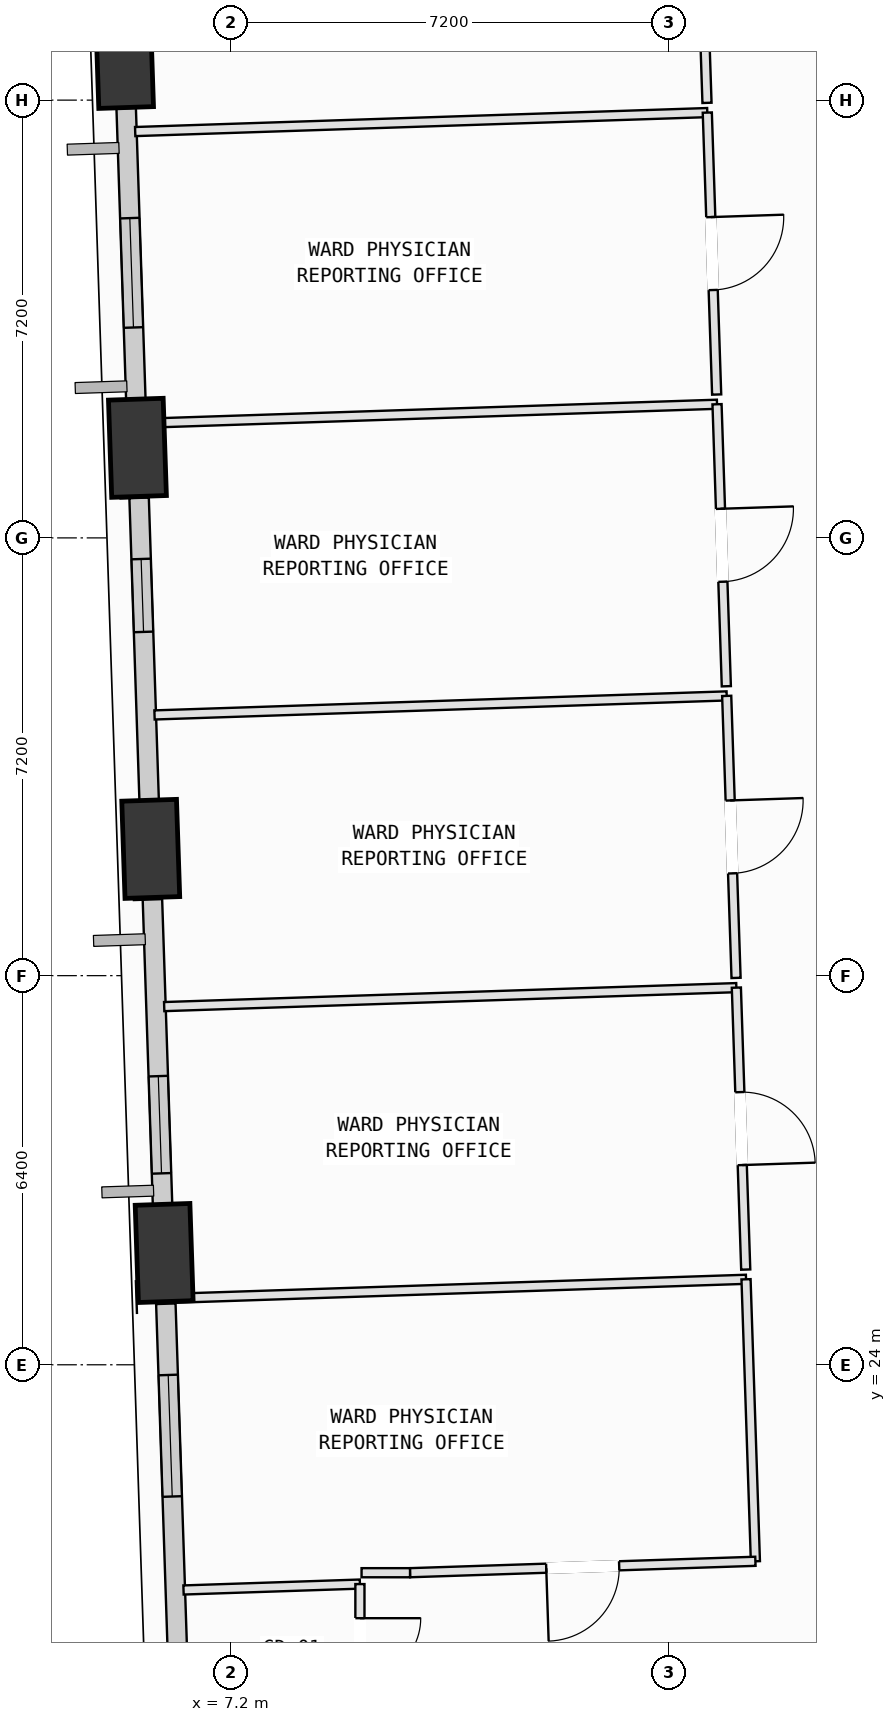
"""IFC4 building model, lengths in metres.
Left out: names, types, materials, properties, quantities, classifications, styles, units other than length and angle.
Written with IfcOpenShell. Run it as: python <this file> out.ifc"""

import sys

from ifc_helpers import new_model, si_unit, direction, frame, frame_2d, origin, origin_2d, place, context, subcontext, project, spatial, rectangle, extrude, element, fill, save


model = new_model("IFC4")
c1 = context("Model", 3, precision=1e-05, world=origin(), true_north=direction((0.0, 1.0)))
c2 = subcontext(c1, "Body", "Model", "MODEL_VIEW")
j1 = project(units=[si_unit("LENGTHUNIT", "METRE"), si_unit("PLANEANGLEUNIT", "RADIAN")], contexts=[c1])
p1 = place(None, origin())
s1 = spatial("IfcSite", under=j1, at=p1, CompositionType="ELEMENT")
p2 = place(p1, origin())
s2 = spatial("IfcBuilding", under=s1, at=p2, CompositionType="ELEMENT")
p3 = place(p2, frame((0.0, 0.0, 31.0)))
s3 = spatial("IfcBuildingStorey", under=s2, at=p3, CompositionType="ELEMENT", Elevation=31.0)
p4 = place(p3, frame((5.449, 45.478, 0.002), z_axis=(-0.083853767304, -0.116198226935, 0.989680007763), x_axis=(0.551939355085, 0.821493784414, 0.143216306606)))
e1 = element("IfcColumn", 1, at=p4, inside=s3, PredefinedType="COLUMN", context=c2, shape_type="SweptSolid", body=[
    extrude(rectangle(XDim=1.6, YDim=0.9, at=origin_2d()), origin(), (0.0, 0.0, 1.0), 4.038),
])
p5 = place(p3, frame((5.661, 39.081, 0.002), z_axis=(-0.057790356596, -0.115338405618, 0.99164374998), x_axis=(0.414334782227, 0.900945231317, 0.128935559113)))
e2 = element("IfcColumn", 2, at=p5, inside=s3, PredefinedType="COLUMN", context=c2, shape_type="SweptSolid", body=[
    extrude(rectangle(XDim=1.6, YDim=0.9, at=origin_2d()), origin(), (0.0, 0.0, 1.0), 4.03),
])
p6 = place(p3, frame((5.88, 32.485, 0.002), z_axis=(-0.030692823871, -0.114339867582, 0.992967444202), x_axis=(0.225270475905, 0.96708477646, 0.11832264291)))
e3 = element("IfcColumn", 3, at=p6, inside=s3, PredefinedType="COLUMN", context=c2, shape_type="SweptSolid", body=[
    extrude(rectangle(XDim=1.6, YDim=0.9, at=origin_2d()), origin(), (0.0, 0.0, 1.0), 4.025),
])
p7 = place(p3, frame((6.1, 25.839, 0.002), z_axis=(-0.00333816856, -0.113254955138, 0.993560351346), x_axis=(-0.003884586791, 0.993559859263, 0.113241847594)))
e4 = element("IfcColumn", 4, at=p7, inside=s3, PredefinedType="COLUMN", context=c2, shape_type="SweptSolid", body=[
    extrude(rectangle(XDim=1.6, YDim=0.9, at=origin_2d()), origin(), (0.0, 0.0, 1.0), 4.022),
])
p8 = place(p3, frame((5.649, 39.448, 0.0), z_axis=(0.0, 0.0, 1.0), x_axis=(-0.033140517624, 0.999450702182, 0.0)))
e5 = element("IfcWall", 5, at=p8, inside=s3, PredefinedType="SOLIDWALL", context=c2, shape_type="SweptSolid", body=[
    extrude(rectangle(XDim=5.223, YDim=0.32, at=frame_2d((2.612, 0.0))), origin(), (0.0, 0.0, 1.0), 3.165),
])
p9 = place(p8, frame((1.614, 0.0, 0.75)))
e6 = element("IfcOpeningElement", 6, at=p9, cuts=e5, PredefinedType="OPENING", context=c2, shape_type="SweptSolid", body=[
    extrude(rectangle(XDim=1.8, YDim=2.05, at=frame_2d((0.9, 1.025))), frame((0.0, 0.17, 0.0), z_axis=(0.0, -1.0, 0.0), x_axis=(1.0, 0.0, 0.0)), (0.0, 0.0, 1.0), 0.34),
])
p10 = place(p3, frame((5.867, 32.861, 0.0), z_axis=(0.0, 0.0, 1.0), x_axis=(-0.033135713124, 0.999450861481, 0.0)))
e7 = element("IfcWall", 7, at=p10, inside=s3, PredefinedType="SOLIDWALL", context=c2, shape_type="SweptSolid", body=[
    extrude(rectangle(XDim=5.401, YDim=0.32, at=frame_2d((2.7, 0.0))), origin(), (0.0, 0.0, 1.0), 3.165),
])
p11 = place(p10, frame((3.195, 0.0, 0.75)))
e8 = element("IfcOpeningElement", 8, at=p11, cuts=e7, PredefinedType="OPENING", context=c2, shape_type="SweptSolid", body=[
    extrude(rectangle(XDim=1.2, YDim=1.75, at=frame_2d((0.6, 0.875))), frame((0.0, 0.17, 0.0), z_axis=(0.0, -1.0, 0.0), x_axis=(1.0, 0.0, 0.0)), (0.0, 0.0, 1.0), 0.34),
])
p12 = place(p3, frame((6.088, 26.219, 0.0), z_axis=(0.0, 0.0, 1.0), x_axis=(-0.033177305137, 0.999449481677, 0.0)))
e9 = element("IfcWall", 9, at=p12, inside=s3, PredefinedType="SOLIDWALL", context=c2, shape_type="SweptSolid", body=[
    extrude(rectangle(XDim=5.438, YDim=0.32, at=frame_2d((2.719, 0.0))), origin(), (0.0, 0.0, 1.0), 3.165),
])
p13 = place(p12, frame((0.93, 0.0, 0.75)))
e10 = element("IfcOpeningElement", 10, at=p13, cuts=e9, PredefinedType="OPENING", context=c2, shape_type="SweptSolid", body=[
    extrude(rectangle(XDim=1.6, YDim=1.95, at=frame_2d((0.8, 0.975))), frame((0.0, 0.17, 0.0), z_axis=(0.0, -1.0, 0.0), x_axis=(1.0, 0.0, 0.0)), (0.0, 0.0, 1.0), 0.34),
])
p14 = place(p3, frame((6.365, 17.872, 0.0), z_axis=(0.0, 0.0, 1.0), x_axis=(-0.033150797565, 0.999450361259, 0.0)))
e11 = element("IfcWall", 11, at=p14, inside=s3, PredefinedType="SOLIDWALL", context=c2, shape_type="SweptSolid", body=[
    extrude(rectangle(XDim=7.136, YDim=0.32, at=frame_2d((3.568, 0.0))), origin(), (0.0, 0.0, 1.0), 3.165),
])
p15 = place(p14, frame((3.964, 0.0, 0.75)))
e12 = element("IfcOpeningElement", 12, at=p15, cuts=e11, PredefinedType="OPENING", context=c2, shape_type="SweptSolid", body=[
    extrude(rectangle(XDim=2.0, YDim=1.95, at=frame_2d((1.0, 0.975))), frame((0.0, 0.17, 0.0), z_axis=(0.0, -1.0, 0.0), x_axis=(1.0, 0.0, 0.0)), (0.0, 0.0, 1.0), 0.34),
])
p16 = place(p3, frame((6.419, 20.296, 0.0), z_axis=(0.0, 0.0, 1.0), x_axis=(0.999439573388, 0.033474455121, 0.0)))
e13 = element("IfcWall", 13, at=p16, inside=s3, PredefinedType="PARTITIONING", context=c2, shape_type="SweptSolid", body=[
    extrude(rectangle(XDim=2.903, YDim=0.15, at=frame_2d((1.451, 0.0))), origin(), (0.0, 0.0, 1.0), 3.78),
])
p17 = place(p3, frame((9.32, 20.393, 0.0), z_axis=(0.0, 0.0, 1.0), x_axis=(0.0, -1.0, 0.0)))
e14 = element("IfcWall", 14, at=p17, inside=s3, PredefinedType="PARTITIONING", context=c2, shape_type="SweptSolid", body=[
    extrude(rectangle(XDim=2.122, YDim=0.15, at=frame_2d((1.061, 0.0))), origin(), (0.0, 0.0, 1.0), 3.78),
])
p18 = place(p17, frame((0.561, 0.0, 0.0)))
e15 = element("IfcOpeningElement", 15, at=p18, cuts=e14, PredefinedType="OPENING", context=c2, shape_type="SweptSolid", body=[
    extrude(rectangle(XDim=1.0, YDim=2.12, at=frame_2d((0.5, 1.06))), frame((0.0, 0.085, 0.0), z_axis=(0.0, -1.0, 0.0), x_axis=(1.0, 0.0, 0.0)), (0.0, 0.0, 1.0), 0.17),
])
p19 = place(p3, frame((6.229, 25.093, 0.0), z_axis=(0.0, 0.0, 1.0), x_axis=(0.999450914597, 0.033134111004, 0.0)))
e16 = element("IfcWall", 16, at=p19, inside=s3, PredefinedType="PARTITIONING", context=c2, shape_type="SweptSolid", body=[
    extrude(rectangle(XDim=9.446, YDim=0.15, at=frame_2d((4.723, 0.0))), origin(), (0.0, 0.0, 1.0), 3.78),
])
p20 = place(p3, frame((15.67, 25.406, 0.0), z_axis=(0.0, 0.0, 1.0), x_axis=(0.033197462788, -0.999448812328, 0.0)))
e17 = element("IfcWall", 17, at=p20, inside=s3, PredefinedType="PARTITIONING", context=c2, shape_type="SweptSolid", body=[
    extrude(rectangle(XDim=4.64, YDim=0.15, at=frame_2d((2.32, 0.0))), origin(), (0.0, 0.0, 1.0), 3.78),
])
p21 = place(p3, frame((15.824, 20.768, 0.0), z_axis=(0.0, 0.0, 1.0), x_axis=(-0.999452746279, -0.033078814298, 0.0)))
e18 = element("IfcWall", 18, at=p21, inside=s3, PredefinedType="PARTITIONING", context=c2, shape_type="SweptSolid", body=[
    extrude(rectangle(XDim=5.683, YDim=0.15, at=frame_2d((2.842, 0.0))), origin(), (0.0, 0.0, 1.0), 3.78),
])
p22 = place(p21, frame((2.242, 0.0, 0.0)))
e19 = element("IfcOpeningElement", 19, at=p22, cuts=e18, PredefinedType="OPENING", context=c2, shape_type="SweptSolid", body=[
    extrude(rectangle(XDim=1.2, YDim=2.15, at=frame_2d((0.6, 1.075))), frame((0.0, 0.085, 0.0), z_axis=(0.0, -1.0, 0.0), x_axis=(1.0, 0.0, 0.0)), (0.0, 0.0, 1.0), 0.17),
])
p23 = place(p3, frame((10.144, 20.58, 0.0), z_axis=(0.0, 0.0, 1.0), x_axis=(-1.0, 0.0, 0.0)))
e20 = element("IfcWall", 20, at=p23, inside=s3, PredefinedType="PARTITIONING", context=c2, shape_type="SweptSolid", body=[
    extrude(rectangle(XDim=0.797, YDim=0.15, at=frame_2d((0.398, 0.0))), origin(), (0.0, 0.0, 1.0), 3.78),
])
p24 = place(p3, frame((6.101, 29.891, 0.0), z_axis=(0.0, 0.0, 1.0), x_axis=(0.999451592483, 0.033113657048, 0.0)))
e21 = element("IfcWall", 21, at=p24, inside=s3, PredefinedType="PARTITIONING", context=c2, shape_type="SweptSolid", body=[
    extrude(rectangle(XDim=9.415, YDim=0.15, at=frame_2d((4.708, 0.0))), origin(), (0.0, 0.0, 1.0), 3.78),
])
p25 = place(p3, frame((15.511, 30.203, 0.0), z_axis=(0.0, 0.0, 1.0), x_axis=(0.033204446596, -0.999448580331, 0.0)))
e22 = element("IfcWall", 22, at=p25, inside=s3, PredefinedType="PARTITIONING", context=c2, shape_type="SweptSolid", body=[
    extrude(rectangle(XDim=4.639, YDim=0.15, at=frame_2d((2.32, 0.0))), origin(), (0.0, 0.0, 1.0), 3.78),
])
p26 = place(p25, frame((1.72, 0.0, 0.0)))
e23 = element("IfcOpeningElement", 23, at=p26, cuts=e22, PredefinedType="OPENING", context=c2, shape_type="SweptSolid", body=[
    extrude(rectangle(XDim=1.2, YDim=2.15, at=frame_2d((0.6, 1.075))), frame((0.0, 0.085, 0.0), z_axis=(0.0, -1.0, 0.0), x_axis=(1.0, 0.0, 0.0)), (0.0, 0.0, 1.0), 0.17),
])
p27 = place(p3, frame((5.89, 25.242, 0.0), z_axis=(0.0, 0.0, 1.0), x_axis=(-0.032987831618, 0.99945575338, 0.0)))
e24 = element("IfcWall", 24, at=p27, inside=s3, PredefinedType="PARTITIONING", context=c2, shape_type="SweptSolid", body=[
    extrude(rectangle(XDim=0.969, YDim=0.15, at=frame_2d((0.485, 0.0))), origin(), (0.0, 0.0, 1.0), 3.165),
])
p28 = place(p3, frame((5.942, 34.688, 0.0), z_axis=(0.0, 0.0, 1.0), x_axis=(0.999447321799, 0.033242306625, 0.0)))
e25 = element("IfcWall", 25, at=p28, inside=s3, PredefinedType="PARTITIONING", context=c2, shape_type="SweptSolid", body=[
    extrude(rectangle(XDim=9.415, YDim=0.15, at=frame_2d((4.708, 0.0))), origin(), (0.0, 0.0, 1.0), 3.78),
])
p29 = place(p3, frame((15.352, 35.001, 0.0), z_axis=(0.0, 0.0, 1.0), x_axis=(0.033197462788, -0.999448812328, 0.0)))
e26 = element("IfcWall", 26, at=p29, inside=s3, PredefinedType="PARTITIONING", context=c2, shape_type="SweptSolid", body=[
    extrude(rectangle(XDim=4.64, YDim=0.15, at=frame_2d((2.32, 0.0))), origin(), (0.0, 0.0, 1.0), 2.865),
])
p30 = place(p29, frame((1.72, 0.0, 0.0)))
e27 = element("IfcOpeningElement", 27, at=p30, cuts=e26, PredefinedType="OPENING", context=c2, shape_type="SweptSolid", body=[
    extrude(rectangle(XDim=1.2, YDim=2.15, at=frame_2d((0.6, 1.075))), frame((0.0, 0.085, 0.0), z_axis=(0.0, -1.0, 0.0), x_axis=(1.0, 0.0, 0.0)), (0.0, 0.0, 1.0), 0.17),
])
p31 = place(p3, frame((5.678, 31.646, 0.0), z_axis=(0.0, 0.0, 1.0), x_axis=(-0.033153285945, 0.999450278719, 0.0)))
e28 = element("IfcWall", 28, at=p31, inside=s3, PredefinedType="PARTITIONING", context=c2, shape_type="SweptSolid", body=[
    extrude(rectangle(XDim=1.208, YDim=0.15, at=frame_2d((0.604, 0.0))), origin(), (0.0, 0.0, 1.0), 3.165),
])
p32 = place(p3, frame((5.783, 39.486, 0.0), z_axis=(0.0, 0.0, 1.0), x_axis=(0.999450762432, 0.03313870056, 0.0)))
e29 = element("IfcWall", 29, at=p32, inside=s3, PredefinedType="PARTITIONING", context=c2, shape_type="SweptSolid", body=[
    extrude(rectangle(XDim=9.415, YDim=0.15, at=frame_2d((4.708, 0.0))), origin(), (0.0, 0.0, 1.0), 3.78),
])
p33 = place(p3, frame((15.193, 39.798, 0.0), z_axis=(0.0, 0.0, 1.0), x_axis=(0.032932963172, -0.999457562849, 0.0)))
e30 = element("IfcWall", 30, at=p33, inside=s3, PredefinedType="PARTITIONING", context=c2, shape_type="SweptSolid", body=[
    extrude(rectangle(XDim=4.641, YDim=0.15, at=frame_2d((2.32, 0.0))), origin(), (0.0, 0.0, 1.0), 2.865),
])
p34 = place(p33, frame((1.72, 0.0, 0.0)))
e31 = element("IfcOpeningElement", 31, at=p34, cuts=e30, PredefinedType="OPENING", context=c2, shape_type="SweptSolid", body=[
    extrude(rectangle(XDim=1.2, YDim=2.15, at=frame_2d((0.6, 1.075))), frame((0.0, 0.085, 0.0), z_axis=(0.0, -1.0, 0.0), x_axis=(1.0, 0.0, 0.0)), (0.0, 0.0, 1.0), 0.17),
])
p35 = place(p3, frame((5.459, 38.251, 0.0), z_axis=(0.0, 0.0, 1.0), x_axis=(-0.033656486127, 0.999433459987, 0.0)))
e32 = element("IfcWall", 32, at=p35, inside=s3, PredefinedType="PARTITIONING", context=c2, shape_type="SweptSolid", body=[
    extrude(rectangle(XDim=1.19, YDim=0.15, at=frame_2d((0.595, 0.0))), origin(), (0.0, 0.0, 1.0), 3.165),
])
p36 = place(p3, frame((5.624, 44.283, 0.0), z_axis=(0.0, 0.0, 1.0), x_axis=(0.999450620025, 0.03314299521, 0.0)))
e33 = element("IfcWall", 33, at=p36, inside=s3, PredefinedType="PARTITIONING", context=c2, shape_type="SweptSolid", body=[
    extrude(rectangle(XDim=9.414, YDim=0.15, at=frame_2d((4.707, 0.0))), origin(), (0.0, 0.0, 1.0), 3.78),
])
p37 = place(p3, frame((15.033, 44.595, 0.0), z_axis=(0.0, 0.0, 1.0), x_axis=(0.033204446596, -0.999448580331, 0.0)))
e34 = element("IfcWall", 34, at=p37, inside=s3, PredefinedType="PARTITIONING", context=c2, shape_type="SweptSolid", body=[
    extrude(rectangle(XDim=4.639, YDim=0.15, at=frame_2d((2.32, 0.0))), origin(), (0.0, 0.0, 1.0), 2.865),
])
p38 = place(p37, frame((1.72, 0.0, 0.0)))
e35 = element("IfcOpeningElement", 35, at=p38, cuts=e34, PredefinedType="OPENING", context=c2, shape_type="SweptSolid", body=[
    extrude(rectangle(XDim=1.2, YDim=2.15, at=frame_2d((0.6, 1.075))), frame((0.0, 0.085, 0.0), z_axis=(0.0, -1.0, 0.0), x_axis=(1.0, 0.0, 0.0)), (0.0, 0.0, 1.0), 0.17),
])
p39 = place(p3, frame((14.871, 49.483, 0.0), z_axis=(0.0, 0.0, 1.0), x_axis=(0.033184233647, -0.999449251657, 0.0)))
e36 = element("IfcWall", 36, at=p39, inside=s3, PredefinedType="PARTITIONING", context=c2, shape_type="SweptSolid", body=[
    extrude(rectangle(XDim=4.731, YDim=0.15, at=frame_2d((2.365, 0.0))), origin(), (0.0, 0.0, 1.0), 3.78),
])
p40 = place(p39, frame((1.89, 0.0, 0.0)))
e37 = element("IfcOpeningElement", 37, at=p40, cuts=e36, PredefinedType="OPENING", context=c2, shape_type="SweptSolid", body=[
    extrude(rectangle(XDim=1.2, YDim=2.15, at=frame_2d((0.6, 1.075))), frame((0.0, 0.085, 0.0), z_axis=(0.0, -1.0, 0.0), x_axis=(1.0, 0.0, 0.0)), (0.0, 0.0, 1.0), 0.17),
])
p41 = place(p3, frame((5.246, 44.66, 0.0), z_axis=(0.0, 0.0, 1.0), x_axis=(-0.033009726512, 0.999455030482, 0.0)))
e38 = element("IfcWall", 38, at=p41, inside=s3, PredefinedType="PARTITIONING", context=c2, shape_type="SweptSolid", body=[
    extrude(rectangle(XDim=2.211, YDim=0.15, at=frame_2d((1.106, 0.0))), origin(), (0.0, 0.0, 1.0), 3.165),
])
p42 = place(p9, origin())
e39 = element("IfcWindow", 39, at=p42, inside=s3, PartitioningType="SINGLE_PANEL", PredefinedType="WINDOW", context=c2, shape_type="SweptSolid", body=[
    extrude(rectangle(XDim=1.8, YDim=2.05, at=frame_2d((0.9, 1.025))), frame((0.0, 0.03, 0.0), z_axis=(0.0, -1.0, 0.0), x_axis=(1.0, 0.0, 0.0)), (0.0, 0.0, 1.0), 0.06),
])
fill(e6, e39)
p43 = place(p11, origin())
e40 = element("IfcWindow", 40, at=p43, inside=s3, PartitioningType="SINGLE_PANEL", PredefinedType="WINDOW", context=c2, shape_type="SweptSolid", body=[
    extrude(rectangle(XDim=1.2, YDim=1.75, at=frame_2d((0.6, 0.875))), frame((0.0, 0.03, 0.0), z_axis=(0.0, -1.0, 0.0), x_axis=(1.0, 0.0, 0.0)), (0.0, 0.0, 1.0), 0.06),
])
fill(e8, e40)
p44 = place(p13, origin())
e41 = element("IfcWindow", 41, at=p44, inside=s3, PartitioningType="SINGLE_PANEL", PredefinedType="WINDOW", context=c2, shape_type="SweptSolid", body=[
    extrude(rectangle(XDim=1.6, YDim=1.95, at=frame_2d((0.8, 0.975))), frame((0.0, 0.03, 0.0), z_axis=(0.0, -1.0, 0.0), x_axis=(1.0, 0.0, 0.0)), (0.0, 0.0, 1.0), 0.06),
])
fill(e10, e41)
p45 = place(p15, origin())
e42 = element("IfcWindow", 42, at=p45, inside=s3, PartitioningType="SINGLE_PANEL", PredefinedType="WINDOW", context=c2, shape_type="SweptSolid", body=[
    extrude(rectangle(XDim=2.0, YDim=1.95, at=frame_2d((1.0, 0.975))), frame((0.0, 0.03, 0.0), z_axis=(0.0, -1.0, 0.0), x_axis=(1.0, 0.0, 0.0)), (0.0, 0.0, 1.0), 0.06),
])
fill(e12, e42)
p46 = place(p18, origin())
e43 = element("IfcDoor", 43, at=p46, inside=s3, OperationType="SINGLE_SWING_LEFT", PredefinedType="DOOR", context=c2, shape_type="SweptSolid", body=[
    extrude(rectangle(XDim=1.0, YDim=2.12, at=frame_2d((0.5, 1.06))), frame((0.0, 0.025, 0.0), z_axis=(0.0, -1.0, 0.0), x_axis=(1.0, 0.0, 0.0)), (0.0, 0.0, 1.0), 0.05),
])
fill(e15, e43)
p47 = place(p22, origin())
e44 = element("IfcDoor", 44, at=p47, inside=s3, OperationType="SINGLE_SWING_RIGHT", PredefinedType="DOOR", context=c2, shape_type="SweptSolid", body=[
    extrude(rectangle(XDim=1.2, YDim=2.15, at=frame_2d((0.6, 1.075))), frame((0.0, 0.025, 0.0), z_axis=(0.0, -1.0, 0.0), x_axis=(1.0, 0.0, 0.0)), (0.0, 0.0, 1.0), 0.05),
])
fill(e19, e44)
p48 = place(p26, origin())
e45 = element("IfcDoor", 45, at=p48, inside=s3, OperationType="SINGLE_SWING_RIGHT", PredefinedType="DOOR", context=c2, shape_type="SweptSolid", body=[
    extrude(rectangle(XDim=1.2, YDim=2.15, at=frame_2d((0.6, 1.075))), frame((0.0, 0.025, 0.0), z_axis=(0.0, -1.0, 0.0), x_axis=(1.0, 0.0, 0.0)), (0.0, 0.0, 1.0), 0.05),
])
fill(e23, e45)
p49 = place(p30, origin())
e46 = element("IfcDoor", 46, at=p49, inside=s3, OperationType="SINGLE_SWING_LEFT", PredefinedType="DOOR", context=c2, shape_type="SweptSolid", body=[
    extrude(rectangle(XDim=1.2, YDim=2.15, at=frame_2d((0.6, 1.075))), frame((0.0, 0.025, 0.0), z_axis=(0.0, -1.0, 0.0), x_axis=(1.0, 0.0, 0.0)), (0.0, 0.0, 1.0), 0.05),
])
fill(e27, e46)
p50 = place(p34, origin())
e47 = element("IfcDoor", 47, at=p50, inside=s3, OperationType="SINGLE_SWING_LEFT", PredefinedType="DOOR", context=c2, shape_type="SweptSolid", body=[
    extrude(rectangle(XDim=1.2, YDim=2.15, at=frame_2d((0.6, 1.075))), frame((0.0, 0.025, 0.0), z_axis=(0.0, -1.0, 0.0), x_axis=(1.0, 0.0, 0.0)), (0.0, 0.0, 1.0), 0.05),
])
fill(e31, e47)
p51 = place(p38, origin())
e48 = element("IfcDoor", 48, at=p51, inside=s3, OperationType="SINGLE_SWING_LEFT", PredefinedType="DOOR", context=c2, shape_type="SweptSolid", body=[
    extrude(rectangle(XDim=1.2, YDim=2.15, at=frame_2d((0.6, 1.075))), frame((0.0, 0.025, 0.0), z_axis=(0.0, -1.0, 0.0), x_axis=(1.0, 0.0, 0.0)), (0.0, 0.0, 1.0), 0.05),
])
fill(e35, e48)
save(model, sys.argv[1])
